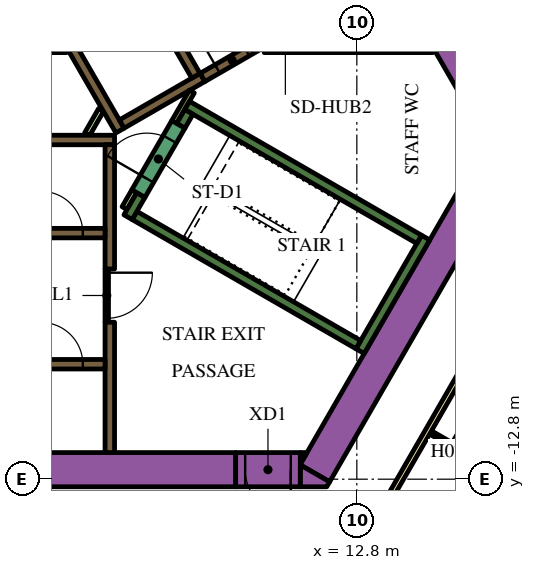
"""IFC4 building model, lengths in metres.
Left out: names, types, materials, properties, quantities, classifications, styles, units other than length and angle.
Written with IfcOpenShell. Run it as: python <this file> out.ifc"""

import sys

from ifc_helpers import new_model, si_unit, direction, frame, frame_2d, origin, place, context, subcontext, project, spatial, polyline, rectangle, outline, extrude, element, fill, save


model = new_model("IFC4")
c1 = context("Model", 3, precision=1e-05, world=origin(), true_north=direction((0.0, 1.0)))
c2 = subcontext(c1, "Body", "Model", "MODEL_VIEW")
j1 = project(units=[si_unit("LENGTHUNIT", "METRE"), si_unit("PLANEANGLEUNIT", "RADIAN")], contexts=[c1])
p1 = place(None, origin())
s1 = spatial("IfcSite", under=j1, at=p1, CompositionType="ELEMENT")
p2 = place(p1, origin())
s2 = spatial("IfcBuilding", under=s1, at=p2, CompositionType="ELEMENT")
p3 = place(p2, frame((0.0, 0.0, 99.3)))
s3 = spatial("IfcBuildingStorey", under=s2, at=p3, CompositionType="ELEMENT", Elevation=99.3)
p4 = place(p3, frame((6.776, 13.364, 0.0), z_axis=(0.0, 0.0, 1.0), x_axis=(0.500004177138, -0.8660229921, 0.0)))
e1 = element("IfcWall", 1, at=p4, inside=s3, PredefinedType="SOLIDWALL", context=c2, shape_type="SweptSolid", body=[
    extrude(rectangle(XDim=20.204, YDim=0.9, at=frame_2d((10.102, 0.0))), origin(), (0.0, 0.0, 1.0), 3.9),
])
p5 = place(p3, frame((11.695, -12.644, 0.0), z_axis=(0.0, 0.0, 1.0), x_axis=(0.500010229568, 0.86601949766, 0.0)))
e2 = element("IfcWall", 2, at=p5, inside=s3, PredefinedType="SOLIDWALL", context=c2, shape_type="SweptSolid", body=[
    extrude(rectangle(XDim=9.326, YDim=0.9, at=frame_2d((4.663, 0.0))), origin(), (0.0, 0.0, 1.0), 3.9),
])
p6 = place(p3, origin())
e3 = element("IfcWall", 3, at=p6, inside=s3, PredefinedType="SOLIDWALL", context=c2, shape_type="SweptSolid", body=[
    extrude(outline(polyline([(12.009, -13.0), (11.312, -13.0), (11.312, -12.425), (12.083, -12.871), (12.009, -13.0)])), origin(), (0.0, 0.0, 1.0), 3.9),
])
e4 = element("IfcWall", 4, at=p6, inside=s3, PredefinedType="SOLIDWALL", context=c2, shape_type="SweptSolid", body=[
    extrude(outline(polyline([(11.489, -12.1), (11.312, -12.407), (11.312, -12.1), (11.489, -12.1)])), origin(), (0.0, 0.0, 1.0), 3.9),
])
p7 = place(p3, frame((-12.019, -12.55, 0.0), z_axis=(0.0, 0.0, 1.0), x_axis=(1.0, 0.0, 0.0)))
e5 = element("IfcWall", 5, at=p7, inside=s3, PredefinedType="SOLIDWALL", context=c2, shape_type="SweptSolid", body=[
    extrude(rectangle(XDim=21.63, YDim=0.9, at=frame_2d((10.815, 0.0))), origin(), (0.0, 0.0, 1.0), 3.9),
])
p8 = place(p3, frame((12.885, -9.431, 0.0), z_axis=(0.0, 0.0, 1.0), x_axis=(0.500020560727, 0.866013532718, 0.0)))
e6 = element("IfcWall", 6, at=p8, inside=s3, PredefinedType="SOLIDWALL", context=c2, shape_type="SweptSolid", body=[
    extrude(rectangle(XDim=3.45, YDim=0.25, at=frame_2d((1.725, 0.0))), origin(), (0.0, 0.0, 1.0), 3.9),
])
p9 = place(p3, frame((12.84, -9.261, 0.0), z_axis=(0.0, 0.0, 1.0), x_axis=(-0.866013990052, 0.500019768644, 0.0)))
e7 = element("IfcWall", 7, at=p9, inside=s3, PredefinedType="SOLIDWALL", context=c2, shape_type="SweptSolid", body=[
    extrude(rectangle(XDim=6.8, YDim=0.25, at=frame_2d((3.4, 0.0))), origin(), (0.0, 0.0, 1.0), 3.9),
])
p10 = place(p3, frame((6.78, -5.906, 0.0), z_axis=(0.0, 0.0, 1.0), x_axis=(0.500223362819, 0.865896406789, 0.0)))
e8 = element("IfcWall", 8, at=p10, inside=s3, PredefinedType="SOLIDWALL", context=c2, shape_type="SweptSolid", body=[
    extrude(rectangle(XDim=0.675, YDim=0.25, at=frame_2d((0.337, 0.0))), origin(), (0.0, 0.0, 1.0), 3.9),
])
p11 = place(p3, frame((8.334, -2.964, 0.0), z_axis=(0.0, 0.0, 1.0), x_axis=(0.866016039709, -0.500016218704, 0.0)))
e9 = element("IfcWall", 9, at=p11, inside=s3, PredefinedType="SOLIDWALL", context=c2, shape_type="SweptSolid", body=[
    extrude(rectangle(XDim=7.05, YDim=0.25, at=frame_2d((3.525, 0.0))), origin(), (0.0, 0.0, 1.0), 3.9),
])
p12 = place(p3, frame((8.168, -3.503, 0.0), z_axis=(0.0, 0.0, 1.0), x_axis=(0.49972245349, 0.866185586049, 0.0)))
e10 = element("IfcWall", 10, at=p12, inside=s3, PredefinedType="SOLIDWALL", context=c2, shape_type="SweptSolid", body=[
    extrude(rectangle(XDim=0.425, YDim=0.25, at=frame_2d((0.212, 0.0))), origin(), (0.0, 0.0, 1.0), 3.9),
])
p13 = place(p3, frame((-5.545, -3.875, 0.0), z_axis=(0.0, 0.0, 1.0), x_axis=(1.0, 0.0, 0.0)))
e11 = element("IfcWall", 11, at=p13, inside=s3, PredefinedType="SOLIDWALL", context=c2, shape_type="SweptSolid", body=[
    extrude(rectangle(XDim=11.97, YDim=0.25, at=frame_2d((5.985, 0.0))), origin(), (0.0, 0.0, 1.0), 3.9),
])
p14 = place(p3, frame((6.3, -8.67, 0.0), z_axis=(0.0, 0.0, 1.0), x_axis=(0.0, -1.0, 0.0)))
e12 = element("IfcWall", 12, at=p14, inside=s3, PredefinedType="SOLIDWALL", context=c2, shape_type="SweptSolid", body=[
    extrude(rectangle(XDim=3.43, YDim=0.25, at=frame_2d((1.715, 0.0))), origin(), (0.0, 0.0, 1.0), 3.9),
])
p15 = place(p3, frame((6.3, -7.268, 0.0), z_axis=(0.0, 0.0, 1.0), x_axis=(0.0, 1.0, 0.0)))
e13 = element("IfcWall", 13, at=p15, inside=s3, PredefinedType="SOLIDWALL", context=c2, shape_type="SweptSolid", body=[
    extrude(rectangle(XDim=3.268, YDim=0.25, at=frame_2d((1.634, 0.0))), origin(), (0.0, 0.0, 1.0), 3.9),
])
e14 = element("IfcWall", 14, at=p6, inside=s3, PredefinedType="SOLIDWALL", context=c2, shape_type="SweptSolid", body=[
    extrude(outline(polyline([(0.566, 6.725), (0.566, 6.875), (0.566, 6.875), (0.565, 6.875), (0.361, 6.875), (0.035, 7.439), (0.252, 7.564), (0.377, 7.348), (6.552, -3.348), (6.677, -3.564), (6.46, -3.689), (0.448, 6.725), (0.565, 6.725), (0.566, 6.725), (0.566, 6.725)])), origin(), (0.0, 0.0, 1.0), 3.9),
])
p16 = place(p3, frame((6.614, -3.456, 0.0), z_axis=(0.0, 0.0, 1.0), x_axis=(0.866031582473, 0.499989298045, 0.0)))
e15 = element("IfcWall", 15, at=p16, inside=s3, PredefinedType="SOLIDWALL", context=c2, shape_type="SweptSolid", body=[
    extrude(rectangle(XDim=2.455, YDim=0.25, at=frame_2d((1.228, 0.0))), origin(), (0.0, 0.0, 1.0), 3.9),
])
p17 = place(p3, frame((6.945, -5.222, 0.0), z_axis=(0.0, 0.0, 1.0), x_axis=(-0.499818422106, -0.866130212453, 0.0)))
e16 = element("IfcWall", 16, at=p17, inside=s3, PredefinedType="PARTITIONING", context=c2, shape_type="SweptSolid", body=[
    extrude(rectangle(XDim=0.514, YDim=0.15, at=frame_2d((0.257, 0.0))), origin(), (0.0, 0.0, 1.0), 2.75),
])
p18 = place(p3, frame((5.705, -3.718, 0.0), z_axis=(0.0, 0.0, 1.0), x_axis=(0.499962090823, 0.866047289552, 0.0)))
e17 = element("IfcWall", 17, at=p18, inside=s3, PredefinedType="PARTITIONING", context=c2, shape_type="SweptSolid", body=[
    extrude(rectangle(XDim=0.735, YDim=0.15, at=frame_2d((0.367, 0.0))), origin(), (0.0, 0.0, 1.0), 2.75),
])
p19 = place(p3, frame((8.459, -2.599, 0.0), z_axis=(0.0, 0.0, 1.0), x_axis=(-0.500041054325, -0.866001699761, 0.0)))
e18 = element("IfcWall", 18, at=p19, inside=s3, PredefinedType="PARTITIONING", context=c2, shape_type="SweptSolid", body=[
    extrude(rectangle(XDim=0.929, YDim=0.15, at=frame_2d((0.464, 0.0))), origin(), (0.0, 0.0, 1.0), 3.9),
])
p20 = place(p3, frame((-6.175, -9.775, 0.0), z_axis=(0.0, 0.0, 1.0), x_axis=(1.0, 0.0, 0.0)))
e19 = element("IfcWall", 19, at=p20, inside=s3, PredefinedType="SOLIDWALL", context=c2, shape_type="SweptSolid", body=[
    extrude(rectangle(XDim=12.35, YDim=0.25, at=frame_2d((6.175, 0.0))), origin(), (0.0, 0.0, 1.0), 3.9),
])
p21 = place(p20, frame((0.585, 0.0, 0.0)))
e20 = element("IfcOpeningElement", 20, at=p21, cuts=e19, PredefinedType="OPENING", context=c2, shape_type="SweptSolid", body=[
    extrude(rectangle(XDim=1.1, YDim=2.1, at=frame_2d((0.55, 1.05))), frame((0.0, 0.135, 0.0), z_axis=(0.0, -1.0, 0.0), x_axis=(1.0, 0.0, 0.0)), (0.0, 0.0, 1.0), 0.27),
])
p22 = place(p20, frame((3.105, 0.0, 0.0)))
e21 = element("IfcOpeningElement", 21, at=p22, cuts=e19, PredefinedType="OPENING", context=c2, shape_type="SweptSolid", body=[
    extrude(rectangle(XDim=1.1, YDim=2.1, at=frame_2d((0.55, 1.05))), frame((0.0, 0.135, 0.0), z_axis=(0.0, -1.0, 0.0), x_axis=(1.0, 0.0, 0.0)), (0.0, 0.0, 1.0), 0.27),
])
p23 = place(p20, frame((5.625, 0.0, 0.0)))
e22 = element("IfcOpeningElement", 22, at=p23, cuts=e19, PredefinedType="OPENING", context=c2, shape_type="SweptSolid", body=[
    extrude(rectangle(XDim=1.1, YDim=2.1, at=frame_2d((0.55, 1.05))), frame((0.0, 0.135, 0.0), z_axis=(0.0, -1.0, 0.0), x_axis=(1.0, 0.0, 0.0)), (0.0, 0.0, 1.0), 0.27),
])
p24 = place(p20, frame((8.145, 0.0, 0.0)))
e23 = element("IfcOpeningElement", 23, at=p24, cuts=e19, PredefinedType="OPENING", context=c2, shape_type="SweptSolid", body=[
    extrude(rectangle(XDim=1.1, YDim=2.1, at=frame_2d((0.55, 1.05))), frame((0.0, 0.135, 0.0), z_axis=(0.0, -1.0, 0.0), x_axis=(1.0, 0.0, 0.0)), (0.0, 0.0, 1.0), 0.27),
])
p25 = place(p20, frame((10.665, 0.0, 0.0)))
e24 = element("IfcOpeningElement", 24, at=p25, cuts=e19, PredefinedType="OPENING", context=c2, shape_type="SweptSolid", body=[
    extrude(rectangle(XDim=1.1, YDim=2.1, at=frame_2d((0.55, 1.05))), frame((0.0, 0.135, 0.0), z_axis=(0.0, -1.0, 0.0), x_axis=(1.0, 0.0, 0.0)), (0.0, 0.0, 1.0), 0.27),
])
p26 = place(p3, frame((-6.175, -6.325, 0.0), z_axis=(0.0, 0.0, 1.0), x_axis=(1.0, 0.0, 0.0)))
e25 = element("IfcWall", 25, at=p26, inside=s3, PredefinedType="SOLIDWALL", context=c2, shape_type="SweptSolid", body=[
    extrude(rectangle(XDim=12.35, YDim=0.25, at=frame_2d((6.175, 0.0))), origin(), (0.0, 0.0, 1.0), 3.9),
])
p27 = place(p26, frame((3.205, 0.0, 0.0)))
e26 = element("IfcOpeningElement", 26, at=p27, cuts=e25, PredefinedType="OPENING", context=c2, shape_type="SweptSolid", body=[
    extrude(rectangle(XDim=0.9, YDim=2.1, at=frame_2d((0.45, 1.05))), frame((0.0, 0.135, 0.0), z_axis=(0.0, -1.0, 0.0), x_axis=(1.0, 0.0, 0.0)), (0.0, 0.0, 1.0), 0.27),
])
p28 = place(p26, frame((8.145, 0.0, 0.0)))
e27 = element("IfcOpeningElement", 27, at=p28, cuts=e25, PredefinedType="OPENING", context=c2, shape_type="SweptSolid", body=[
    extrude(rectangle(XDim=1.1, YDim=2.1, at=frame_2d((0.55, 1.05))), frame((0.0, 0.135, 0.0), z_axis=(0.0, -1.0, 0.0), x_axis=(1.0, 0.0, 0.0)), (0.0, 0.0, 1.0), 0.27),
])
p29 = place(p26, frame((10.665, 0.0, 0.0)))
e28 = element("IfcOpeningElement", 28, at=p29, cuts=e25, PredefinedType="OPENING", context=c2, shape_type="SweptSolid", body=[
    extrude(rectangle(XDim=1.1, YDim=2.1, at=frame_2d((0.55, 1.05))), frame((0.0, 0.135, 0.0), z_axis=(0.0, -1.0, 0.0), x_axis=(1.0, 0.0, 0.0)), (0.0, 0.0, 1.0), 0.27),
])
p30 = place(p3, frame((8.565, -2.185, 0.0), z_axis=(0.0, 0.0, 1.0), x_axis=(-0.499997954832, 0.866026584559, 0.0)))
e29 = element("IfcWall", 29, at=p30, inside=s3, PredefinedType="SOLIDWALL", context=c2, shape_type="SweptSolid", body=[
    extrude(rectangle(XDim=12.35, YDim=0.25, at=frame_2d((6.175, 0.0))), origin(), (0.0, 0.0, 1.0), 3.9),
])
p31 = place(p30, frame((5.725, 0.0, 0.0)))
e30 = element("IfcOpeningElement", 30, at=p31, cuts=e29, PredefinedType="OPENING", context=c2, shape_type="SweptSolid", body=[
    extrude(rectangle(XDim=0.9, YDim=2.1, at=frame_2d((0.45, 1.05))), frame((0.0, 0.135, 0.0), z_axis=(0.0, -1.0, 0.0), x_axis=(1.0, 0.0, 0.0)), (0.0, 0.0, 1.0), 0.27),
])
p32 = place(p3, frame((7.053, -5.284, 0.0), z_axis=(0.0, 0.0, 1.0), x_axis=(0.500078061341, 0.865980330357, 0.0)))
e31 = element("IfcWall", 31, at=p32, inside=s3, PredefinedType="SOLIDWALL", context=c2, shape_type="SweptSolid", body=[
    extrude(rectangle(XDim=2.1, YDim=0.4, at=frame_2d((1.05, 0.0))), origin(), (0.0, 0.0, 1.0), 3.9),
])
p33 = place(p32, frame((0.45, 0.0, 0.0)))
e32 = element("IfcOpeningElement", 32, at=p33, cuts=e31, PredefinedType="OPENING", context=c2, shape_type="SweptSolid", body=[
    extrude(rectangle(XDim=1.2, YDim=2.1, at=frame_2d((0.6, 1.05))), frame((0.0, 0.21, 0.0), z_axis=(0.0, -1.0, 0.0), x_axis=(1.0, 0.0, 0.0)), (0.0, 0.0, 1.0), 0.42),
])
p34 = place(p3, frame((8.74, -2.229, 0.0), z_axis=(0.0, 0.0, 1.0), x_axis=(0.865989075817, 0.500062916607, 0.0)))
e33 = element("IfcWall", 33, at=p34, inside=s3, PredefinedType="SOLIDWALL", context=c2, shape_type="SweptSolid", body=[
    extrude(rectangle(XDim=1.8, YDim=0.25, at=frame_2d((0.9, 0.0))), origin(), (0.0, 0.0, 1.0), 3.9),
])
p35 = place(p34, frame((0.45, 0.0, 0.0)))
e34 = element("IfcOpeningElement", 34, at=p35, cuts=e33, PredefinedType="OPENING", context=c2, shape_type="SweptSolid", body=[
    extrude(rectangle(XDim=0.9, YDim=2.1, at=frame_2d((0.45, 1.05))), frame((0.0, 0.135, 0.0), z_axis=(0.0, -1.0, 0.0), x_axis=(1.0, 0.0, 0.0)), (0.0, 0.0, 1.0), 0.27),
])
p36 = place(p3, frame((6.22, -7.266, 0.0), z_axis=(0.0, 0.0, 1.0), x_axis=(0.0, -1.0, 0.0)))
e35 = element("IfcWall", 35, at=p36, inside=s3, PredefinedType="PARTITIONING", context=c2, shape_type="SweptSolid", body=[
    extrude(rectangle(XDim=1.4, YDim=0.09, at=frame_2d((0.7, 0.0))), origin(), (0.0, 0.0, 1.0), 2.75),
])
p37 = place(p36, frame((0.1, 0.0, 0.0)))
e36 = element("IfcOpeningElement", 36, at=p37, cuts=e35, PredefinedType="OPENING", context=c2, shape_type="SweptSolid", body=[
    extrude(rectangle(XDim=1.2, YDim=2.1, at=frame_2d((0.6, 1.05))), frame((0.0, 0.055, 0.0), z_axis=(0.0, -1.0, 0.0), x_axis=(1.0, 0.0, 0.0)), (0.0, 0.0, 1.0), 0.11),
])
p38 = place(p3, frame((11.312, -12.55, 0.0), z_axis=(0.0, 0.0, 1.0), x_axis=(-1.0, 0.0, 0.0)))
e37 = element("IfcWall", 37, at=p38, inside=s3, PredefinedType="SOLIDWALL", context=c2, shape_type="SweptSolid", body=[
    extrude(rectangle(XDim=1.7, YDim=0.9, at=frame_2d((0.85, 0.0))), origin(), (0.0, 0.0, 1.0), 3.9),
])
p39 = place(p38, frame((0.25, 0.0, 0.0)))
e38 = element("IfcOpeningElement", 38, at=p39, cuts=e37, PredefinedType="OPENING", context=c2, shape_type="SweptSolid", body=[
    extrude(rectangle(XDim=1.2, YDim=2.1, at=frame_2d((0.6, 1.05))), frame((0.0, 0.46, 0.0), z_axis=(0.0, -1.0, 0.0), x_axis=(1.0, 0.0, 0.0)), (0.0, 0.0, 1.0), 0.92),
])
p40 = place(p3, frame((6.163, 18.475, 0.0), z_axis=(0.0, 0.0, 1.0), x_axis=(0.500001317485, -0.866024643133, 0.0)))
e39 = element("IfcWall", 39, at=p40, inside=s3, PredefinedType="PARTITIONING", context=c2, shape_type="SweptSolid", body=[
    extrude(rectangle(XDim=25.767, YDim=0.15, at=frame_2d((12.883, 0.0))), origin(), (0.0, 0.0, 1.0), 2.75),
])
p41 = place(p40, frame((24.241, 0.0, 0.0)))
e40 = element("IfcOpeningElement", 40, at=p41, cuts=e39, PredefinedType="OPENING", context=c2, shape_type="SweptSolid", body=[
    extrude(rectangle(XDim=1.0, YDim=2.1, at=frame_2d((0.5, 1.05))), frame((0.0, 0.085, 0.0), z_axis=(0.0, -1.0, 0.0), x_axis=(1.0, 0.0, 0.0)), (0.0, 0.0, 1.0), 0.17),
])
p42 = place(p40, frame((13.144, 0.0, 0.0)))
e41 = element("IfcOpeningElement", 41, at=p42, cuts=e39, PredefinedType="OPENING", context=c2, shape_type="SweptSolid", body=[
    extrude(rectangle(XDim=1.0, YDim=2.1, at=frame_2d((0.5, 1.05))), frame((0.0, 0.085, 0.0), z_axis=(0.0, -1.0, 0.0), x_axis=(1.0, 0.0, 0.0)), (0.0, 0.0, 1.0), 0.17),
])
p43 = place(p40, frame((11.592, 0.0, 0.0)))
e42 = element("IfcOpeningElement", 42, at=p43, cuts=e39, PredefinedType="OPENING", context=c2, shape_type="SweptSolid", body=[
    extrude(rectangle(XDim=1.1, YDim=2.1, at=frame_2d((0.55, 1.05))), frame((0.0, 0.085, 0.0), z_axis=(0.0, -1.0, 0.0), x_axis=(1.0, 0.0, 0.0)), (0.0, 0.0, 1.0), 0.17),
])
p44 = place(p40, frame((4.674, 0.0, 0.0)))
e43 = element("IfcOpeningElement", 43, at=p44, cuts=e39, PredefinedType="OPENING", context=c2, shape_type="SweptSolid", body=[
    extrude(rectangle(XDim=0.9, YDim=2.1, at=frame_2d((0.45, 1.05))), frame((0.0, 0.085, 0.0), z_axis=(0.0, -1.0, 0.0), x_axis=(1.0, 0.0, 0.0)), (0.0, 0.0, 1.0), 0.17),
])
p45 = place(p40, frame((2.411, 0.0, 0.0)))
e44 = element("IfcOpeningElement", 44, at=p45, cuts=e39, PredefinedType="OPENING", context=c2, shape_type="SweptSolid", body=[
    extrude(rectangle(XDim=1.0, YDim=2.1, at=frame_2d((0.5, 1.05))), frame((0.0, 0.085, 0.0), z_axis=(0.0, -1.0, 0.0), x_axis=(1.0, 0.0, 0.0)), (0.0, 0.0, 1.0), 0.17),
])
p46 = place(p3, frame((15.587, -9.952, 0.0), z_axis=(0.0, 0.0, 1.0), x_axis=(-0.500016618951, -0.866015808616, 0.0)))
e45 = element("IfcWall", 45, at=p46, inside=s3, PredefinedType="PARTITIONING", context=c2, shape_type="SweptSolid", body=[
    extrude(rectangle(XDim=5.268, YDim=0.15, at=frame_2d((2.634, 0.0))), origin(), (0.0, 0.0, 1.0), 2.75),
])
p47 = place(p46, frame((4.088, 0.0, 0.0)))
e46 = element("IfcOpeningElement", 46, at=p47, cuts=e45, PredefinedType="OPENING", context=c2, shape_type="SweptSolid", body=[
    extrude(rectangle(XDim=1.0, YDim=2.1, at=frame_2d((0.5, 1.05))), frame((0.0, 0.085, 0.0), z_axis=(0.0, -1.0, 0.0), x_axis=(1.0, 0.0, 0.0)), (0.0, 0.0, 1.0), 0.17),
])
p48 = place(p3, frame((14.74, -11.57, 0.0), z_axis=(0.0, 0.0, 1.0), x_axis=(0.866021400173, -0.500006934395, 0.0)))
e47 = element("IfcWall", 47, at=p48, inside=s3, PredefinedType="PARTITIONING", context=c2, shape_type="SweptSolid", body=[
    extrude(rectangle(XDim=2.6, YDim=0.1, at=frame_2d((1.3, 0.0))), origin(), (0.0, 0.0, 1.0), 2.75),
])
p49 = place(p48, frame((0.6, 0.0, 0.0)))
e48 = element("IfcOpeningElement", 48, at=p49, cuts=e47, PredefinedType="OPENING", context=c2, shape_type="SweptSolid", body=[
    extrude(rectangle(XDim=0.9, YDim=2.1, at=frame_2d((0.45, 1.05))), frame((0.0, 0.06, 0.0), z_axis=(0.0, -1.0, 0.0), x_axis=(1.0, 0.0, 0.0)), (0.0, 0.0, 1.0), 0.12),
])
p50 = place(p25, origin())
e49 = element("IfcDoor", 49, at=p50, inside=s3, OperationType="DOUBLE_DOOR_SLIDING", PredefinedType="DOOR", context=c2, shape_type="SweptSolid", body=[
    extrude(rectangle(XDim=1.1, YDim=2.1, at=frame_2d((0.55, 1.05))), frame((0.0, 0.025, 0.0), z_axis=(0.0, -1.0, 0.0), x_axis=(1.0, 0.0, 0.0)), (0.0, 0.0, 1.0), 0.05),
])
fill(e24, e49)
p51 = place(p29, origin())
e50 = element("IfcDoor", 50, at=p51, inside=s3, OperationType="DOUBLE_DOOR_SLIDING", PredefinedType="DOOR", context=c2, shape_type="SweptSolid", body=[
    extrude(rectangle(XDim=1.1, YDim=2.1, at=frame_2d((0.55, 1.05))), frame((0.0, 0.025, 0.0), z_axis=(0.0, -1.0, 0.0), x_axis=(1.0, 0.0, 0.0)), (0.0, 0.0, 1.0), 0.05),
])
fill(e28, e50)
p52 = place(p33, origin())
e51 = element("IfcDoor", 51, at=p52, inside=s3, OperationType="SINGLE_SWING_LEFT", PredefinedType="DOOR", context=c2, shape_type="SweptSolid", body=[
    extrude(rectangle(XDim=1.2, YDim=2.1, at=frame_2d((0.6, 1.05))), frame((0.0, 0.025, 0.0), z_axis=(0.0, -1.0, 0.0), x_axis=(1.0, 0.0, 0.0)), (0.0, 0.0, 1.0), 0.05),
])
fill(e32, e51)
p53 = place(p35, origin())
e52 = element("IfcDoor", 52, at=p53, inside=s3, OperationType="SINGLE_SWING_LEFT", PredefinedType="DOOR", context=c2, shape_type="SweptSolid", body=[
    extrude(rectangle(XDim=0.9, YDim=2.1, at=frame_2d((0.45, 1.05))), frame((0.0, 0.025, 0.0), z_axis=(0.0, -1.0, 0.0), x_axis=(1.0, 0.0, 0.0)), (0.0, 0.0, 1.0), 0.05),
])
fill(e34, e52)
p54 = place(p37, origin())
e53 = element("IfcDoor", 53, at=p54, inside=s3, OperationType="SINGLE_SWING_LEFT", PredefinedType="DOOR", context=c2, shape_type="SweptSolid", body=[
    extrude(rectangle(XDim=1.2, YDim=2.1, at=frame_2d((0.6, 1.05))), frame((0.0, 0.025, 0.0), z_axis=(0.0, -1.0, 0.0), x_axis=(1.0, 0.0, 0.0)), (0.0, 0.0, 1.0), 0.05),
])
fill(e36, e53)
p55 = place(p39, origin())
e54 = element("IfcDoor", 54, at=p55, inside=s3, OperationType="SINGLE_SWING_LEFT", PredefinedType="DOOR", context=c2, shape_type="SweptSolid", body=[
    extrude(rectangle(XDim=1.2, YDim=2.1, at=frame_2d((0.6, 1.05))), frame((0.0, 0.025, 0.0), z_axis=(0.0, -1.0, 0.0), x_axis=(1.0, 0.0, 0.0)), (0.0, 0.0, 1.0), 0.05),
])
fill(e38, e54)
p56 = place(p49, origin())
e55 = element("IfcDoor", 55, at=p56, inside=s3, OperationType="SINGLE_SWING_LEFT", PredefinedType="DOOR", context=c2, shape_type="SweptSolid", body=[
    extrude(rectangle(XDim=0.9, YDim=2.1, at=frame_2d((0.45, 1.05))), frame((0.0, 0.025, 0.0), z_axis=(0.0, -1.0, 0.0), x_axis=(1.0, 0.0, 0.0)), (0.0, 0.0, 1.0), 0.05),
])
fill(e48, e55)
save(model, sys.argv[1])
